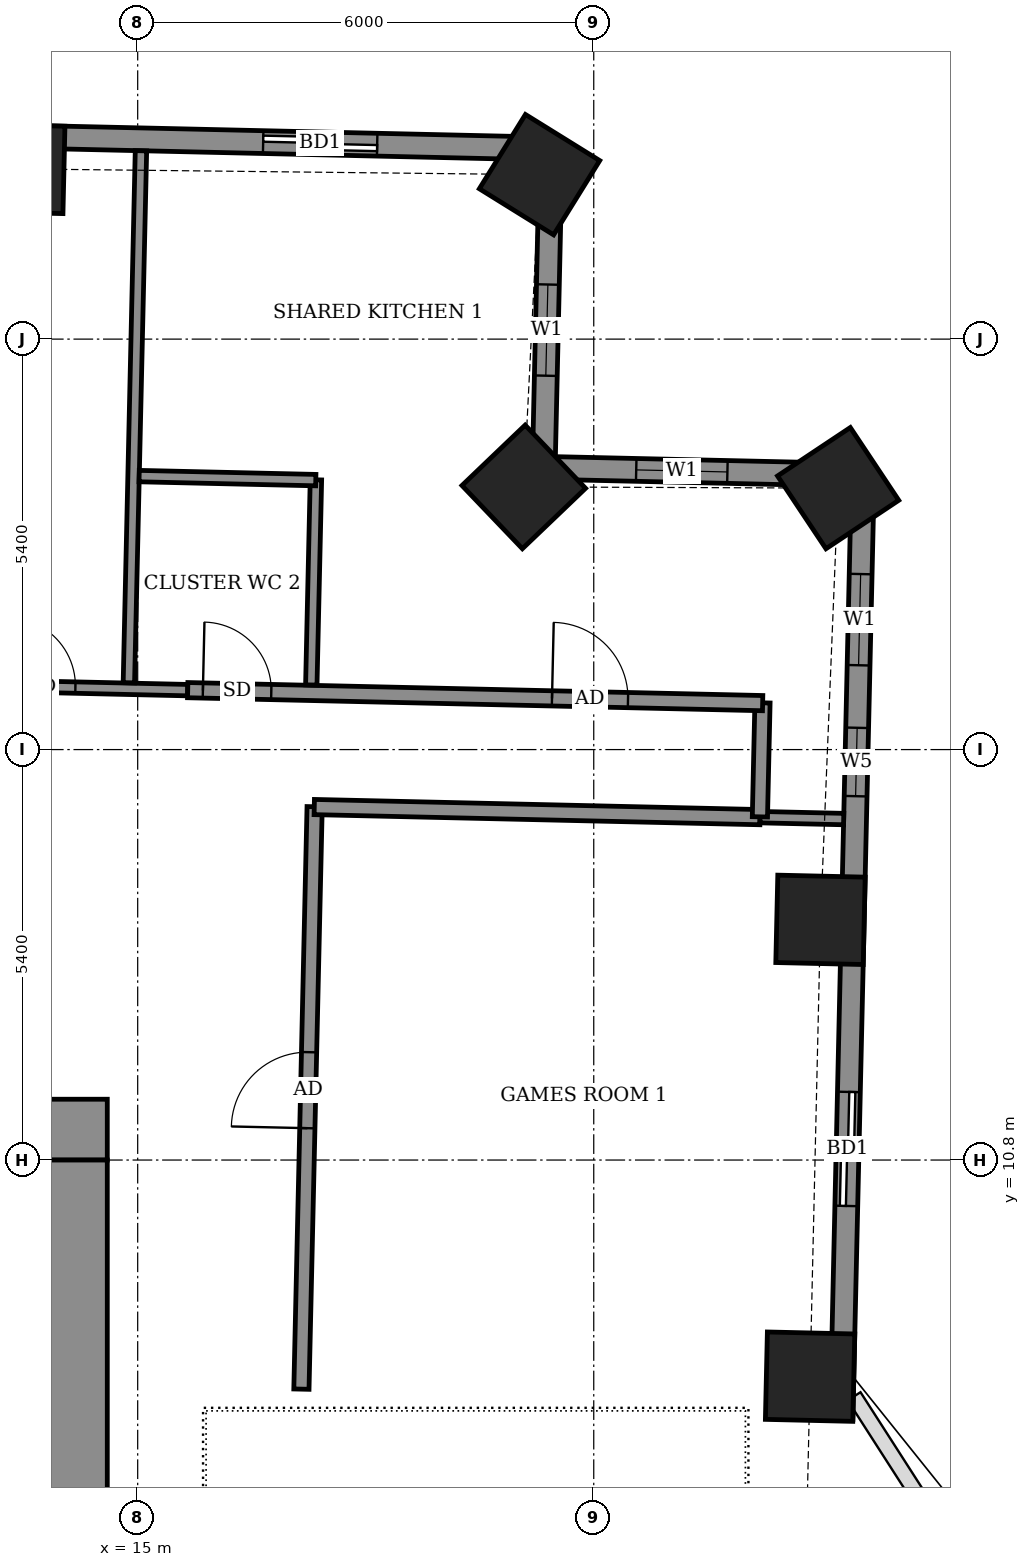
"""IFC4 building model, lengths in metres.
Left out: names, types, materials, properties, quantities, classifications, styles, units other than length and angle.
Written with IfcOpenShell. Run it as: python <this file> out.ifc"""

import sys

from ifc_helpers import new_model, si_unit, direction, frame, frame_2d, origin, origin_2d, place, context, subcontext, project, spatial, rectangle, extrude, element, fill, save


model = new_model("IFC4")
c1 = context("Model", 3, precision=1e-05, world=origin(), true_north=direction((0.0, 1.0)))
c2 = subcontext(c1, "Body", "Model", "MODEL_VIEW")
j1 = project(units=[si_unit("LENGTHUNIT", "METRE"), si_unit("PLANEANGLEUNIT", "RADIAN")], contexts=[c1])
p1 = place(None, origin())
s1 = spatial("IfcSite", under=j1, at=p1, CompositionType="ELEMENT")
p2 = place(p1, origin())
s2 = spatial("IfcBuilding", under=s1, at=p2, CompositionType="ELEMENT")
p3 = place(p2, frame((0.0, 0.0, 205.1)))
s3 = spatial("IfcBuildingStorey", under=s2, at=p3, CompositionType="ELEMENT", Elevation=205.1)
for number, where, z_axis, x_axis in (
    (1, (23.846, 7.95, -0.55), (0.0, 0.0, 1.0), (0.023, 1.0, 0.0)),
    (2, (23.983, 13.96, -0.55), (0.0, 0.0, 1.0), (0.023, 1.0, 0.0)),
    (3, (24.215, 19.639, -0.55), (0.0, 0.0, 1.0), (-0.554, 0.833, 0.0)),
    (4, (20.079, 19.656, -0.55), (0.0, 0.0, 1.0), (-0.691, 0.723, 0.0)),
    (5, (20.287, 23.763, -0.55), (0.0, 0.0, 1.0), (-0.85, 0.527, 0.0)),
    (6, (13.455, 23.839, -0.55), (0.0, 0.0, 1.0), (-1.0, 0.023, 0.0)),
):
    element("IfcColumn", number, at=place(p3, frame(where, z_axis=z_axis, x_axis=x_axis)), inside=s3, PredefinedType="COLUMN", context=c2, shape_type="SweptSolid", body=[
        extrude(rectangle(XDim=1.15, YDim=1.15, at=origin_2d()), origin(), (0.0, 0.0, 1.0), 3.6),
    ])
p4 = place(p3, frame((24.259, 7.391, 0.0), z_axis=(0.0, 0.0, 1.0), x_axis=(0.022696408441, 0.999742403344, 0.0)))
e7 = element("IfcWall", 7, at=p4, inside=s3, PredefinedType="SOLIDWALL", context=c2, shape_type="SweptSolid", body=[
    extrude(rectangle(XDim=12.424, YDim=0.3, at=frame_2d((6.212, 0.0))), origin(), (0.0, 0.0, 1.0), 3.05),
])
p5 = place(p4, frame((2.806, 0.0, 0.0)))
e8 = element("IfcOpeningElement", 8, at=p5, cuts=e7, PredefinedType="OPENING", context=c2, shape_type="SweptSolid", body=[
    extrude(rectangle(XDim=1.5, YDim=2.4, at=frame_2d((0.75, 1.2))), frame((0.0, 0.16, 0.0), z_axis=(0.0, -1.0, 0.0), x_axis=(1.0, 0.0, 0.0)), (0.0, 0.0, 1.0), 0.32),
])
p6 = place(p4, frame((8.198, 0.0, 0.9)))
e9 = element("IfcOpeningElement", 9, at=p6, cuts=e7, PredefinedType="OPENING", context=c2, shape_type="SweptSolid", body=[
    extrude(rectangle(XDim=0.9, YDim=1.5, at=frame_2d((0.45, 0.75))), frame((0.0, 0.16, 0.0), z_axis=(0.0, -1.0, 0.0), x_axis=(1.0, 0.0, 0.0)), (0.0, 0.0, 1.0), 0.32),
])
p7 = place(p4, frame((9.921, 0.0, 0.9)))
e10 = element("IfcOpeningElement", 10, at=p7, cuts=e7, PredefinedType="OPENING", context=c2, shape_type="SweptSolid", body=[
    extrude(rectangle(XDim=1.2, YDim=1.5, at=frame_2d((0.6, 0.75))), frame((0.0, 0.16, 0.0), z_axis=(0.0, -1.0, 0.0), x_axis=(1.0, 0.0, 0.0)), (0.0, 0.0, 1.0), 0.32),
])
p8 = place(p3, frame((24.541, 19.812, 0.0), z_axis=(0.0, 0.0, 1.0), x_axis=(-0.999744320311, 0.022611811187, 0.0)))
e11 = element("IfcWall", 11, at=p8, inside=s3, PredefinedType="SOLIDWALL", context=c2, shape_type="SweptSolid", body=[
    extrude(rectangle(XDim=4.2, YDim=0.3, at=frame_2d((2.1, 0.0))), origin(), (0.0, 0.0, 1.0), 2.55),
])
p9 = place(p8, frame((1.783, 0.0, 0.9)))
e12 = element("IfcOpeningElement", 12, at=p9, cuts=e11, PredefinedType="OPENING", context=c2, shape_type="SweptSolid", body=[
    extrude(rectangle(XDim=1.2, YDim=1.5, at=frame_2d((0.6, 0.75))), frame((0.0, 0.16, 0.0), z_axis=(0.0, -1.0, 0.0), x_axis=(1.0, 0.0, 0.0)), (0.0, 0.0, 1.0), 0.32),
])
p10 = place(p3, frame((20.342, 19.907, 0.0), z_axis=(0.0, 0.0, 1.0), x_axis=(0.022611811187, 0.999744320311, 0.0)))
e13 = element("IfcWall", 13, at=p10, inside=s3, PredefinedType="SOLIDWALL", context=c2, shape_type="SweptSolid", body=[
    extrude(rectangle(XDim=4.2, YDim=0.3, at=frame_2d((2.1, 0.0))), origin(), (0.0, 0.0, 1.0), 2.55),
])
p11 = place(p10, frame((1.212, 0.0, 0.9)))
e14 = element("IfcOpeningElement", 14, at=p11, cuts=e13, PredefinedType="OPENING", context=c2, shape_type="SweptSolid", body=[
    extrude(rectangle(XDim=1.2, YDim=1.5, at=frame_2d((0.6, 0.75))), frame((0.0, 0.16, 0.0), z_axis=(0.0, -1.0, 0.0), x_axis=(1.0, 0.0, 0.0)), (0.0, 0.0, 1.0), 0.32),
])
p12 = place(p3, frame((20.437, 24.106, 0.0), z_axis=(0.0, 0.0, 1.0), x_axis=(-0.999742506232, 0.022691875925, 0.0)))
e15 = element("IfcWall", 15, at=p12, inside=s3, PredefinedType="SOLIDWALL", context=c2, shape_type="SweptSolid", body=[
    extrude(rectangle(XDim=42.444, YDim=0.3, at=frame_2d((21.222, 0.0))), origin(), (0.0, 0.0, 1.0), 3.05),
])
p13 = place(p12, frame((2.287, 0.0, 0.0)))
e16 = element("IfcOpeningElement", 16, at=p13, cuts=e15, PredefinedType="OPENING", context=c2, shape_type="SweptSolid", body=[
    extrude(rectangle(XDim=1.5, YDim=2.4, at=frame_2d((0.75, 1.2))), frame((0.0, 0.16, 0.0), z_axis=(0.0, -1.0, 0.0), x_axis=(1.0, 0.0, 0.0)), (0.0, 0.0, 1.0), 0.32),
])
p14 = place(p12, frame((7.947, 0.0, 0.0)))
e17 = element("IfcOpeningElement", 17, at=p14, cuts=e15, PredefinedType="OPENING", context=c2, shape_type="SweptSolid", body=[
    extrude(rectangle(XDim=1.5, YDim=2.4, at=frame_2d((0.75, 1.2))), frame((0.0, 0.16, 0.0), z_axis=(0.0, -1.0, 0.0), x_axis=(1.0, 0.0, 0.0)), (0.0, 0.0, 1.0), 0.32),
])
p15 = place(p12, frame((11.184, 0.0, 0.0)))
e18 = element("IfcOpeningElement", 18, at=p15, cuts=e15, PredefinedType="OPENING", context=c2, shape_type="SweptSolid", body=[
    extrude(rectangle(XDim=1.5, YDim=2.4, at=frame_2d((0.75, 1.2))), frame((0.0, 0.16, 0.0), z_axis=(0.0, -1.0, 0.0), x_axis=(1.0, 0.0, 0.0)), (0.0, 0.0, 1.0), 0.32),
])
p16 = place(p12, frame((16.469, 0.0, 0.0)))
e19 = element("IfcOpeningElement", 19, at=p16, cuts=e15, PredefinedType="OPENING", context=c2, shape_type="SweptSolid", body=[
    extrude(rectangle(XDim=1.5, YDim=2.4, at=frame_2d((0.75, 1.2))), frame((0.0, 0.16, 0.0), z_axis=(0.0, -1.0, 0.0), x_axis=(1.0, 0.0, 0.0)), (0.0, 0.0, 1.0), 0.32),
])
p17 = place(p12, frame((22.02, 0.0, 0.0)))
e20 = element("IfcOpeningElement", 20, at=p17, cuts=e15, PredefinedType="OPENING", context=c2, shape_type="SweptSolid", body=[
    extrude(rectangle(XDim=1.5, YDim=2.4, at=frame_2d((0.75, 1.2))), frame((0.0, 0.16, 0.0), z_axis=(0.0, -1.0, 0.0), x_axis=(1.0, 0.0, 0.0)), (0.0, 0.0, 1.0), 0.32),
])
p18 = place(p12, frame((25.257, 0.0, 0.0)))
e21 = element("IfcOpeningElement", 21, at=p18, cuts=e15, PredefinedType="OPENING", context=c2, shape_type="SweptSolid", body=[
    extrude(rectangle(XDim=1.5, YDim=2.4, at=frame_2d((0.75, 1.2))), frame((0.0, 0.16, 0.0), z_axis=(0.0, -1.0, 0.0), x_axis=(1.0, 0.0, 0.0)), (0.0, 0.0, 1.0), 0.32),
])
p19 = place(p12, frame((30.057, 0.0, 0.0)))
e22 = element("IfcOpeningElement", 22, at=p19, cuts=e15, PredefinedType="OPENING", context=c2, shape_type="SweptSolid", body=[
    extrude(rectangle(XDim=1.5, YDim=2.4, at=frame_2d((0.75, 1.2))), frame((0.0, 0.16, 0.0), z_axis=(0.0, -1.0, 0.0), x_axis=(1.0, 0.0, 0.0)), (0.0, 0.0, 1.0), 0.32),
])
p20 = place(p12, frame((33.294, 0.0, 0.0)))
e23 = element("IfcOpeningElement", 23, at=p20, cuts=e15, PredefinedType="OPENING", context=c2, shape_type="SweptSolid", body=[
    extrude(rectangle(XDim=1.5, YDim=2.4, at=frame_2d((0.75, 1.2))), frame((0.0, 0.16, 0.0), z_axis=(0.0, -1.0, 0.0), x_axis=(1.0, 0.0, 0.0)), (0.0, 0.0, 1.0), 0.32),
])
p21 = place(p12, frame((38.484, 0.0, 0.9)))
e24 = element("IfcOpeningElement", 24, at=p21, cuts=e15, PredefinedType="OPENING", context=c2, shape_type="SweptSolid", body=[
    extrude(rectangle(XDim=2.4, YDim=1.5, at=frame_2d((1.2, 0.75))), frame((0.0, 0.16, 0.0), z_axis=(0.0, -1.0, 0.0), x_axis=(1.0, 0.0, 0.0)), (0.0, 0.0, 1.0), 0.32),
])
p22 = place(p3, frame((17.154, 7.786, 0.0), z_axis=(0.0, 0.0, 1.0), x_axis=(0.022680883318, 0.999742755679, 0.0)))
e25 = element("IfcWall", 25, at=p22, inside=s3, PredefinedType="PARTITIONING", context=c2, shape_type="SweptSolid", body=[
    extrude(rectangle(XDim=7.664, YDim=0.2, at=frame_2d((3.832, 0.0))), origin(), (0.0, 0.0, 1.0), 3.05),
])
p23 = place(p22, frame((3.434, 0.0, 0.0)))
e26 = element("IfcOpeningElement", 26, at=p23, cuts=e25, PredefinedType="OPENING", context=c2, shape_type="SweptSolid", body=[
    extrude(rectangle(XDim=1.0, YDim=2.1, at=frame_2d((0.5, 1.05))), frame((0.0, 0.11, 0.0), z_axis=(0.0, -1.0, 0.0), x_axis=(1.0, 0.0, 0.0)), (0.0, 0.0, 1.0), 0.22),
])
p24 = place(p3, frame((17.323, 15.444, 0.0), z_axis=(0.0, 0.0, 1.0), x_axis=(0.999742758565, -0.022680756085, 0.0)))
e27 = element("IfcWall", 27, at=p24, inside=s3, PredefinedType="PARTITIONING", context=c2, shape_type="SweptSolid", body=[
    extrude(rectangle(XDim=5.866, YDim=0.2, at=frame_2d((2.933, 0.0))), origin(), (0.0, 0.0, 1.0), 3.05),
])
p25 = place(p3, frame((23.188, 15.311, 0.0), z_axis=(0.0, 0.0, 1.0), x_axis=(0.999738848859, -0.022852441507, 0.0)))
e28 = element("IfcWall", 28, at=p25, inside=s3, PredefinedType="PARTITIONING", context=c2, shape_type="SweptSolid", body=[
    extrude(rectangle(XDim=1.1, YDim=0.15, at=frame_2d((0.55, 0.0))), origin(), (0.0, 0.0, 1.0), 2.55),
])
p26 = place(p3, frame((23.186, 15.315, 0.0), z_axis=(0.0, 0.0, 1.0), x_axis=(0.022617910375, 0.999744182344, 0.0)))
e29 = element("IfcWall", 29, at=p26, inside=s3, PredefinedType="PARTITIONING", context=c2, shape_type="SweptSolid", body=[
    extrude(rectangle(XDim=1.5, YDim=0.2, at=frame_2d((0.75, 0.0))), origin(), (0.0, 0.0, 1.0), 3.05),
])
p27 = place(p3, frame((-14.871, 17.675, 0.0), z_axis=(0.0, 0.0, 1.0), x_axis=(0.999742359486, -0.02269834024, 0.0)))
e30 = element("IfcWall", 30, at=p27, inside=s3, PredefinedType="PARTITIONING", context=c2, shape_type="SweptSolid", body=[
    extrude(rectangle(XDim=30.536, YDim=0.15, at=frame_2d((15.268, 0.0))), origin(), (0.0, 0.0, 1.0), 3.05),
])
p28 = place(p27, frame((28.159, 0.0, 0.0)))
e31 = element("IfcOpeningElement", 31, at=p28, cuts=e30, PredefinedType="OPENING", context=c2, shape_type="SweptSolid", body=[
    extrude(rectangle(XDim=0.9, YDim=2.1, at=frame_2d((0.45, 1.05))), frame((0.0, 0.085, 0.0), z_axis=(0.0, -1.0, 0.0), x_axis=(1.0, 0.0, 0.0)), (0.0, 0.0, 1.0), 0.17),
])
p29 = place(p27, frame((21.034, 0.0, 0.0)))
e32 = element("IfcOpeningElement", 32, at=p29, cuts=e30, PredefinedType="OPENING", context=c2, shape_type="SweptSolid", body=[
    extrude(rectangle(XDim=0.9, YDim=2.1, at=frame_2d((0.45, 1.05))), frame((0.0, 0.085, 0.0), z_axis=(0.0, -1.0, 0.0), x_axis=(1.0, 0.0, 0.0)), (0.0, 0.0, 1.0), 0.17),
])
p30 = place(p27, frame((18.684, 0.0, 0.0)))
e33 = element("IfcOpeningElement", 33, at=p30, cuts=e30, PredefinedType="OPENING", context=c2, shape_type="SweptSolid", body=[
    extrude(rectangle(XDim=0.9, YDim=2.1, at=frame_2d((0.45, 1.05))), frame((0.0, 0.085, 0.0), z_axis=(0.0, -1.0, 0.0), x_axis=(1.0, 0.0, 0.0)), (0.0, 0.0, 1.0), 0.17),
])
p31 = place(p27, frame((11.709, 0.0, 0.0)))
e34 = element("IfcOpeningElement", 34, at=p31, cuts=e30, PredefinedType="OPENING", context=c2, shape_type="SweptSolid", body=[
    extrude(rectangle(XDim=0.9, YDim=2.1, at=frame_2d((0.45, 1.05))), frame((0.0, 0.085, 0.0), z_axis=(0.0, -1.0, 0.0), x_axis=(1.0, 0.0, 0.0)), (0.0, 0.0, 1.0), 0.17),
])
p32 = place(p27, frame((9.734, 0.0, 0.0)))
e35 = element("IfcOpeningElement", 35, at=p32, cuts=e30, PredefinedType="OPENING", context=c2, shape_type="SweptSolid", body=[
    extrude(rectangle(XDim=0.9, YDim=2.1, at=frame_2d((0.45, 1.05))), frame((0.0, 0.085, 0.0), z_axis=(0.0, -1.0, 0.0), x_axis=(1.0, 0.0, 0.0)), (0.0, 0.0, 1.0), 0.17),
])
p33 = place(p27, frame((2.859, 0.0, 0.0)))
e36 = element("IfcOpeningElement", 36, at=p33, cuts=e30, PredefinedType="OPENING", context=c2, shape_type="SweptSolid", body=[
    extrude(rectangle(XDim=0.9, YDim=2.1, at=frame_2d((0.45, 1.05))), frame((0.0, 0.085, 0.0), z_axis=(0.0, -1.0, 0.0), x_axis=(1.0, 0.0, 0.0)), (0.0, 0.0, 1.0), 0.17),
])
p34 = place(p27, frame((0.584, 0.0, 0.0)))
e37 = element("IfcOpeningElement", 37, at=p34, cuts=e30, PredefinedType="OPENING", context=c2, shape_type="SweptSolid", body=[
    extrude(rectangle(XDim=0.9, YDim=2.1, at=frame_2d((0.45, 1.05))), frame((0.0, 0.085, 0.0), z_axis=(0.0, -1.0, 0.0), x_axis=(1.0, 0.0, 0.0)), (0.0, 0.0, 1.0), 0.17),
])
p35 = place(p3, frame((15.658, 16.982, 0.0), z_axis=(0.0, 0.0, 1.0), x_axis=(0.99974485859, -0.022587999516, 0.0)))
e38 = element("IfcWall", 38, at=p35, inside=s3, PredefinedType="PARTITIONING", context=c2, shape_type="SweptSolid", body=[
    extrude(rectangle(XDim=7.566, YDim=0.2, at=frame_2d((3.783, 0.0))), origin(), (0.0, 0.0, 1.0), 3.05),
])
p36 = place(p35, frame((4.794, 0.0, 0.0)))
e39 = element("IfcOpeningElement", 39, at=p36, cuts=e38, PredefinedType="OPENING", context=c2, shape_type="SweptSolid", body=[
    extrude(rectangle(XDim=1.0, YDim=2.1, at=frame_2d((0.5, 1.05))), frame((0.0, 0.11, 0.0), z_axis=(0.0, -1.0, 0.0), x_axis=(1.0, 0.0, 0.0)), (0.0, 0.0, 1.0), 0.22),
])
p37 = place(p35, frame((0.2, 0.0, 0.0)))
e40 = element("IfcOpeningElement", 40, at=p37, cuts=e38, PredefinedType="OPENING", context=c2, shape_type="SweptSolid", body=[
    extrude(rectangle(XDim=0.9, YDim=2.1, at=frame_2d((0.45, 1.05))), frame((0.0, 0.11, 0.0), z_axis=(0.0, -1.0, 0.0), x_axis=(1.0, 0.0, 0.0)), (0.0, 0.0, 1.0), 0.22),
])
p38 = place(p3, frame((14.884, 17.079, 0.0), z_axis=(0.0, 0.0, 1.0), x_axis=(0.022703185001, 0.999742249478, 0.0)))
e41 = element("IfcWall", 41, at=p38, inside=s3, PredefinedType="PARTITIONING", context=c2, shape_type="SweptSolid", body=[
    extrude(rectangle(XDim=7.0, YDim=0.15, at=frame_2d((3.5, 0.0))), origin(), (0.0, 0.0, 1.0), 2.55),
])
p39 = place(p3, frame((17.284, 17.05, 0.0), z_axis=(0.0, 0.0, 1.0), x_axis=(0.02260842146, 0.999744396973, 0.0)))
e42 = element("IfcWall", 42, at=p39, inside=s3, PredefinedType="PARTITIONING", context=c2, shape_type="SweptSolid", body=[
    extrude(rectangle(XDim=2.7, YDim=0.15, at=frame_2d((1.35, 0.0))), origin(), (0.0, 0.0, 1.0), 3.05),
])
p40 = place(p3, frame((15.019, 19.798, 0.0), z_axis=(0.0, 0.0, 1.0), x_axis=(0.999740260747, -0.02279059109, 0.0)))
e43 = element("IfcWall", 43, at=p40, inside=s3, PredefinedType="PARTITIONING", context=c2, shape_type="SweptSolid", body=[
    extrude(rectangle(XDim=2.324, YDim=0.15, at=frame_2d((1.162, 0.0))), origin(), (0.0, 0.0, 1.0), 3.05),
])
p41 = place(p3, frame((-14.6, 11.2, 0.0), z_axis=(0.0, 0.0, 1.0), x_axis=(1.0, 0.0, 0.0)))
e44 = element("IfcWall", 44, at=p41, inside=s3, PredefinedType="SHEAR", context=c2, shape_type="SweptSolid", body=[
    extrude(rectangle(XDim=29.2, YDim=0.8, at=frame_2d((14.6, 0.0))), origin(), (0.0, 0.0, 1.0), 3.6),
])
p42 = place(p3, frame((14.2, -10.8, 0.0), z_axis=(0.0, 0.0, 1.0), x_axis=(0.0, 1.0, 0.0)))
e45 = element("IfcWall", 45, at=p42, inside=s3, PredefinedType="SHEAR", context=c2, shape_type="SweptSolid", body=[
    extrude(rectangle(XDim=21.6, YDim=0.8, at=frame_2d((10.8, 0.0))), origin(), (0.0, 0.0, 1.0), 3.6),
])
p43 = place(p42, frame((1.2, 0.0, 0.0)))
e46 = element("IfcOpeningElement", 46, at=p43, cuts=e45, PredefinedType="OPENING", context=c2, shape_type="SweptSolid", body=[
    extrude(rectangle(XDim=1.2, YDim=2.1, at=frame_2d((0.6, 1.05))), frame((0.0, 0.41, 0.0), z_axis=(0.0, -1.0, 0.0), x_axis=(1.0, 0.0, 0.0)), (0.0, 0.0, 1.0), 0.82),
])
p44 = place(p5, origin())
e47 = element("IfcDoor", 47, at=p44, inside=s3, OperationType="SLIDING_TO_LEFT", PredefinedType="DOOR", context=c2, shape_type="SweptSolid", body=[
    extrude(rectangle(XDim=1.5, YDim=2.4, at=frame_2d((0.75, 1.2))), frame((0.0, 0.025, 0.0), z_axis=(0.0, -1.0, 0.0), x_axis=(1.0, 0.0, 0.0)), (0.0, 0.0, 1.0), 0.05),
])
fill(e8, e47)
p45 = place(p6, origin())
e48 = element("IfcWindow", 48, at=p45, inside=s3, PartitioningType="SINGLE_PANEL", PredefinedType="WINDOW", context=c2, shape_type="SweptSolid", body=[
    extrude(rectangle(XDim=0.9, YDim=1.5, at=frame_2d((0.45, 0.75))), frame((0.0, 0.03, 0.0), z_axis=(0.0, -1.0, 0.0), x_axis=(1.0, 0.0, 0.0)), (0.0, 0.0, 1.0), 0.06),
])
fill(e9, e48)
p46 = place(p7, origin())
e49 = element("IfcWindow", 49, at=p46, inside=s3, PartitioningType="SINGLE_PANEL", PredefinedType="WINDOW", context=c2, shape_type="SweptSolid", body=[
    extrude(rectangle(XDim=1.2, YDim=1.5, at=frame_2d((0.6, 0.75))), frame((0.0, 0.03, 0.0), z_axis=(0.0, -1.0, 0.0), x_axis=(1.0, 0.0, 0.0)), (0.0, 0.0, 1.0), 0.06),
])
fill(e10, e49)
p47 = place(p9, origin())
e50 = element("IfcWindow", 50, at=p47, inside=s3, PartitioningType="SINGLE_PANEL", PredefinedType="WINDOW", context=c2, shape_type="SweptSolid", body=[
    extrude(rectangle(XDim=1.2, YDim=1.5, at=frame_2d((0.6, 0.75))), frame((0.0, 0.03, 0.0), z_axis=(0.0, -1.0, 0.0), x_axis=(1.0, 0.0, 0.0)), (0.0, 0.0, 1.0), 0.06),
])
fill(e12, e50)
p48 = place(p11, origin())
e51 = element("IfcWindow", 51, at=p48, inside=s3, PartitioningType="SINGLE_PANEL", PredefinedType="WINDOW", context=c2, shape_type="SweptSolid", body=[
    extrude(rectangle(XDim=1.2, YDim=1.5, at=frame_2d((0.6, 0.75))), frame((0.0, 0.03, 0.0), z_axis=(0.0, -1.0, 0.0), x_axis=(1.0, 0.0, 0.0)), (0.0, 0.0, 1.0), 0.06),
])
fill(e14, e51)
p49 = place(p13, origin())
e52 = element("IfcDoor", 52, at=p49, inside=s3, OperationType="SLIDING_TO_LEFT", PredefinedType="DOOR", context=c2, shape_type="SweptSolid", body=[
    extrude(rectangle(XDim=1.5, YDim=2.4, at=frame_2d((0.75, 1.2))), frame((0.0, 0.025, 0.0), z_axis=(0.0, -1.0, 0.0), x_axis=(1.0, 0.0, 0.0)), (0.0, 0.0, 1.0), 0.05),
])
fill(e16, e52)
p50 = place(p23, origin())
e53 = element("IfcDoor", 53, at=p50, inside=s3, OperationType="SINGLE_SWING_RIGHT", PredefinedType="DOOR", context=c2, shape_type="SweptSolid", body=[
    extrude(rectangle(XDim=1.0, YDim=2.1, at=frame_2d((0.5, 1.05))), frame((0.0, 0.025, 0.0), z_axis=(0.0, -1.0, 0.0), x_axis=(1.0, 0.0, 0.0)), (0.0, 0.0, 1.0), 0.05),
])
fill(e26, e53)
p51 = place(p36, origin())
e54 = element("IfcDoor", 54, at=p51, inside=s3, OperationType="SINGLE_SWING_LEFT", PredefinedType="DOOR", context=c2, shape_type="SweptSolid", body=[
    extrude(rectangle(XDim=1.0, YDim=2.1, at=frame_2d((0.5, 1.05))), frame((0.0, 0.025, 0.0), z_axis=(0.0, -1.0, 0.0), x_axis=(1.0, 0.0, 0.0)), (0.0, 0.0, 1.0), 0.05),
])
fill(e39, e54)
p52 = place(p37, origin())
e55 = element("IfcDoor", 55, at=p52, inside=s3, OperationType="SINGLE_SWING_LEFT", PredefinedType="DOOR", context=c2, shape_type="SweptSolid", body=[
    extrude(rectangle(XDim=0.9, YDim=2.1, at=frame_2d((0.45, 1.05))), frame((0.0, 0.025, 0.0), z_axis=(0.0, -1.0, 0.0), x_axis=(1.0, 0.0, 0.0)), (0.0, 0.0, 1.0), 0.05),
])
fill(e40, e55)
p53 = place(p28, origin())
e56 = element("IfcDoor", 56, at=p53, inside=s3, OperationType="SINGLE_SWING_RIGHT", PredefinedType="DOOR", context=c2, shape_type="SweptSolid", body=[
    extrude(rectangle(XDim=0.9, YDim=2.1, at=frame_2d((0.45, 1.05))), frame((0.0, 0.025, 0.0), z_axis=(0.0, -1.0, 0.0), x_axis=(1.0, 0.0, 0.0)), (0.0, 0.0, 1.0), 0.05),
])
fill(e31, e56)
save(model, sys.argv[1])
